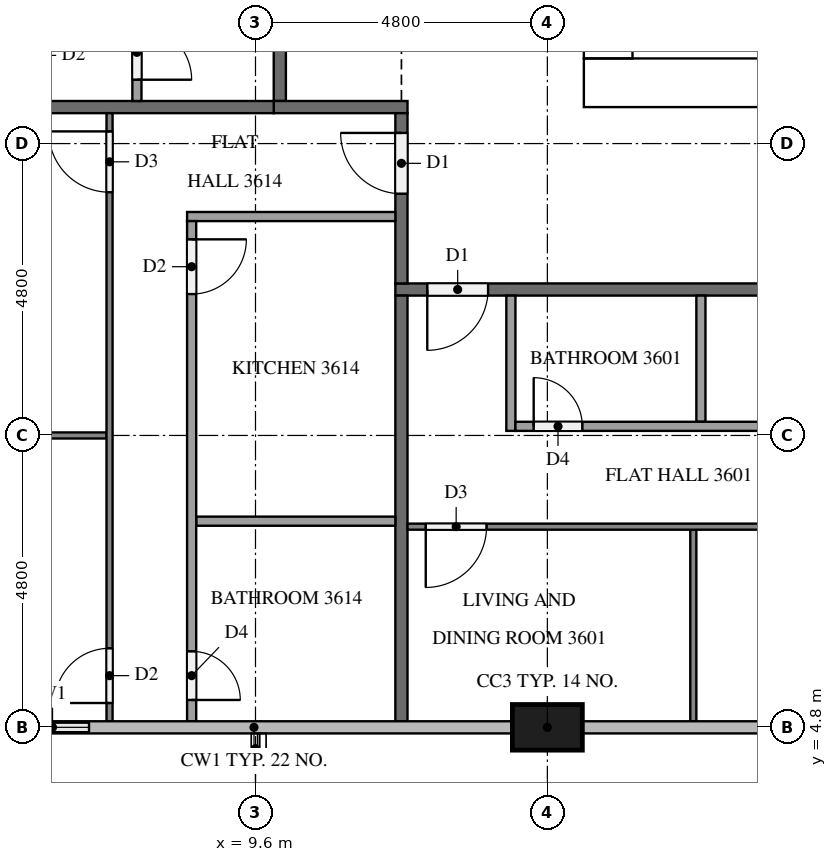
"""IFC4 building model, lengths in metres.
Left out: names, types, materials, properties, quantities, classifications, styles, units other than length and angle.
Written with IfcOpenShell. Run it as: python <this file> out.ifc"""

import sys

from ifc_helpers import new_model, si_unit, direction, frame, frame_2d, origin, origin_2d, place, context, subcontext, project, spatial, rectangle, extrude, element, fill, save


model = new_model("IFC4")
c1 = context("Model", 3, precision=1e-05, world=origin(), true_north=direction((0.0, 1.0)))
c2 = subcontext(c1, "Body", "Model", "MODEL_VIEW")
j1 = project(units=[si_unit("LENGTHUNIT", "METRE"), si_unit("PLANEANGLEUNIT", "RADIAN")], contexts=[c1])
p1 = place(None, origin())
s1 = spatial("IfcSite", under=j1, at=p1, CompositionType="ELEMENT")
p2 = place(p1, origin())
s2 = spatial("IfcBuilding", under=s1, at=p2, CompositionType="ELEMENT")
p3 = place(p2, frame((0.0, 0.0, 140.1)))
s3 = spatial("IfcBuildingStorey", under=s2, at=p3, CompositionType="ELEMENT", Elevation=140.1)
p4 = place(p3, frame((15.0, 15.4, 0.0), z_axis=(0.0, 0.0, 1.0), x_axis=(1.0, 0.0, 0.0)))
e1 = element("IfcWall", 1, at=p4, inside=s3, PredefinedType="SHEAR", context=c2, shape_type="SweptSolid", body=[
    extrude(rectangle(XDim=32.4, YDim=0.8, at=frame_2d((16.2, 0.0))), origin(), (0.0, 0.0, 1.0), 3.1),
])
p5 = place(p4, frame((15.3, 0.0, 0.0)))
e2 = element("IfcOpeningElement", 2, at=p5, cuts=e1, PredefinedType="OPENING", context=c2, shape_type="SweptSolid", body=[
    extrude(rectangle(XDim=1.8, YDim=2.1, at=frame_2d((0.9, 1.05))), frame((0.0, 0.41, 0.0), z_axis=(0.0, -1.0, 0.0), x_axis=(1.0, 0.0, 0.0)), (0.0, 0.0, 1.0), 0.82),
])
p6 = place(p3, frame((15.4, 15.8, 0.0), z_axis=(0.0, 0.0, 1.0), x_axis=(0.0, 1.0, 0.0)))
e3 = element("IfcWall", 3, at=p6, inside=s3, PredefinedType="SHEAR", context=c2, shape_type="SweptSolid", body=[
    extrude(rectangle(XDim=21.2, YDim=0.8, at=frame_2d((10.6, 0.0))), origin(), (0.0, 0.0, 1.0), 3.1),
])
p7 = place(p6, frame((4.96, 0.0, 0.0)))
e4 = element("IfcOpeningElement", 4, at=p7, cuts=e3, PredefinedType="OPENING", context=c2, shape_type="SweptSolid", body=[
    extrude(rectangle(XDim=1.2, YDim=2.1, at=frame_2d((0.6, 1.05))), frame((0.0, 0.41, 0.0), z_axis=(0.0, -1.0, 0.0), x_axis=(1.0, 0.0, 0.0)), (0.0, 0.0, 1.0), 0.82),
])
p8 = place(p3, frame((14.4, 4.8, 0.0), z_axis=(0.0, 0.0, 1.0), x_axis=(1.0, 0.0, 0.0)))
e5 = element("IfcColumn", 5, at=p8, inside=s3, PredefinedType="COLUMN", context=c2, shape_type="SweptSolid", body=[
    extrude(rectangle(XDim=1.15, YDim=0.75, at=origin_2d()), origin(), (0.0, 0.0, 1.0), 3.1),
])
p9 = place(p3, frame((5.325, 4.8, 0.0), z_axis=(0.0, 0.0, 1.0), x_axis=(1.0, 0.0, 0.0)))
e6 = element("IfcWall", 6, at=p9, inside=s3, PredefinedType="SOLIDWALL", context=c2, shape_type="SweptSolid", body=[
    extrude(rectangle(XDim=1.875, YDim=0.15, at=frame_2d((0.938, 0.0))), origin(), (0.0, 0.0, 1.0), 3.1),
])
p10 = place(p9, frame((0.337, 0.0, 0.9)))
e7 = element("IfcOpeningElement", 7, at=p10, cuts=e6, PredefinedType="OPENING", context=c2, shape_type="SweptSolid", body=[
    extrude(rectangle(XDim=1.2, YDim=1.4, at=frame_2d((0.6, 0.7))), frame((0.0, 0.085, 0.0), z_axis=(0.0, -1.0, 0.0), x_axis=(1.0, 0.0, 0.0)), (0.0, 0.0, 1.0), 0.17),
])
p11 = place(p3, frame((50.5, 12.0, 0.0), z_axis=(0.0, 0.0, 1.0), x_axis=(-1.0, 0.0, 0.0)))
e8 = element("IfcWall", 8, at=p11, inside=s3, PredefinedType="PARTITIONING", context=c2, shape_type="SweptSolid", body=[
    extrude(rectangle(XDim=38.6, YDim=0.2, at=frame_2d((19.3, 0.0))), origin(), (0.0, 0.0, 1.0), 3.1),
])
p12 = place(p11, frame((37.075, 0.0, 0.0)))
e9 = element("IfcOpeningElement", 9, at=p12, cuts=e8, PredefinedType="OPENING", context=c2, shape_type="SweptSolid", body=[
    extrude(rectangle(XDim=1.0, YDim=2.1, at=frame_2d((0.5, 1.05))), frame((0.0, 0.11, 0.0), z_axis=(0.0, -1.0, 0.0), x_axis=(1.0, 0.0, 0.0)), (0.0, 0.0, 1.0), 0.22),
])
p13 = place(p11, frame((27.475, 0.0, 0.0)))
e10 = element("IfcOpeningElement", 10, at=p13, cuts=e8, PredefinedType="OPENING", context=c2, shape_type="SweptSolid", body=[
    extrude(rectangle(XDim=1.0, YDim=2.1, at=frame_2d((0.5, 1.05))), frame((0.0, 0.11, 0.0), z_axis=(0.0, -1.0, 0.0), x_axis=(1.0, 0.0, 0.0)), (0.0, 0.0, 1.0), 0.22),
])
p14 = place(p11, frame((0.525, 0.0, 0.0)))
e11 = element("IfcOpeningElement", 11, at=p14, cuts=e8, PredefinedType="OPENING", context=c2, shape_type="SweptSolid", body=[
    extrude(rectangle(XDim=1.0, YDim=2.1, at=frame_2d((0.5, 1.05))), frame((0.0, 0.11, 0.0), z_axis=(0.0, -1.0, 0.0), x_axis=(1.0, 0.0, 0.0)), (0.0, 0.0, 1.0), 0.22),
])
p15 = place(p3, frame((10.0, 15.1, 0.0), z_axis=(0.0, 0.0, 1.0), x_axis=(0.0, 1.0, 0.0)))
e12 = element("IfcWall", 12, at=p15, inside=s3, PredefinedType="PARTITIONING", context=c2, shape_type="SweptSolid", body=[
    extrude(rectangle(XDim=22.6, YDim=0.2, at=frame_2d((11.3, 0.0))), origin(), (0.0, 0.0, 1.0), 3.1),
])
p16 = place(p15, frame((21.275, 0.0, 0.0)))
e13 = element("IfcOpeningElement", 13, at=p16, cuts=e12, PredefinedType="OPENING", context=c2, shape_type="SweptSolid", body=[
    extrude(rectangle(XDim=1.0, YDim=2.1, at=frame_2d((0.5, 1.05))), frame((0.0, 0.11, 0.0), z_axis=(0.0, -1.0, 0.0), x_axis=(1.0, 0.0, 0.0)), (0.0, 0.0, 1.0), 0.22),
])
p17 = place(p15, frame((14.675, 0.0, 0.0)))
e14 = element("IfcOpeningElement", 14, at=p17, cuts=e12, PredefinedType="OPENING", context=c2, shape_type="SweptSolid", body=[
    extrude(rectangle(XDim=1.0, YDim=2.1, at=frame_2d((0.5, 1.05))), frame((0.0, 0.11, 0.0), z_axis=(0.0, -1.0, 0.0), x_axis=(1.0, 0.0, 0.0)), (0.0, 0.0, 1.0), 0.22),
])
p18 = place(p3, frame((9.9, 15.0, 0.0), z_axis=(0.0, 0.0, 1.0), x_axis=(1.0, 0.0, 0.0)))
e15 = element("IfcWall", 15, at=p18, inside=s3, PredefinedType="PARTITIONING", context=c2, shape_type="SweptSolid", body=[
    extrude(rectangle(XDim=2.2, YDim=0.2, at=frame_2d((1.1, 0.0))), origin(), (0.0, 0.0, 1.0), 3.1),
])
p19 = place(p3, frame((12.0, 12.1, 0.0), z_axis=(0.0, 0.0, 1.0), x_axis=(0.0, 1.0, 0.0)))
e16 = element("IfcWall", 16, at=p19, inside=s3, PredefinedType="PARTITIONING", context=c2, shape_type="SweptSolid", body=[
    extrude(rectangle(XDim=2.8, YDim=0.2, at=frame_2d((1.4, 0.0))), origin(), (0.0, 0.0, 1.0), 3.1),
])
p20 = place(p19, frame((1.475, 0.0, 0.0)))
e17 = element("IfcOpeningElement", 17, at=p20, cuts=e16, PredefinedType="OPENING", context=c2, shape_type="SweptSolid", body=[
    extrude(rectangle(XDim=1.0, YDim=2.1, at=frame_2d((0.5, 1.05))), frame((0.0, 0.11, 0.0), z_axis=(0.0, -1.0, 0.0), x_axis=(1.0, 0.0, 0.0)), (0.0, 0.0, 1.0), 0.22),
])
p21 = place(p3, frame((12.0, 4.9, 0.0), z_axis=(0.0, 0.0, 1.0), x_axis=(0.0, 1.0, 0.0)))
e18 = element("IfcWall", 18, at=p21, inside=s3, PredefinedType="PARTITIONING", context=c2, shape_type="SweptSolid", body=[
    extrude(rectangle(XDim=7.0, YDim=0.2, at=frame_2d((3.5, 0.0))), origin(), (0.0, 0.0, 1.0), 3.1),
])
p22 = place(p3, frame((0.1, 15.0, 0.0), z_axis=(0.0, 0.0, 1.0), x_axis=(1.0, 0.0, 0.0)))
e19 = element("IfcWall", 19, at=p22, inside=s3, PredefinedType="PARTITIONING", context=c2, shape_type="SweptSolid", body=[
    extrude(rectangle(XDim=9.8, YDim=0.2, at=frame_2d((4.9, 0.0))), origin(), (0.0, 0.0, 1.0), 3.1),
])
p23 = place(p3, frame((16.8, 8.05, 0.0), z_axis=(0.0, 0.0, 1.0), x_axis=(0.0, -1.0, 0.0)))
e20 = element("IfcWall", 20, at=p23, inside=s3, PredefinedType="PARTITIONING", context=c2, shape_type="SweptSolid", body=[
    extrude(rectangle(XDim=3.15, YDim=0.1, at=frame_2d((1.575, 0.0))), origin(), (0.0, 0.0, 1.0), 3.1),
])
p24 = place(p3, frame((21.5, 8.1, 0.0), z_axis=(0.0, 0.0, 1.0), x_axis=(-1.0, 0.0, 0.0)))
e21 = element("IfcWall", 21, at=p24, inside=s3, PredefinedType="PARTITIONING", context=c2, shape_type="SweptSolid", body=[
    extrude(rectangle(XDim=9.4, YDim=0.1, at=frame_2d((4.7, 0.0))), origin(), (0.0, 0.0, 1.0), 3.1),
])
p25 = place(p24, frame((8.1, 0.0, 0.0)))
e22 = element("IfcOpeningElement", 22, at=p25, cuts=e21, PredefinedType="OPENING", context=c2, shape_type="SweptSolid", body=[
    extrude(rectangle(XDim=1.0, YDim=2.1, at=frame_2d((0.5, 1.05))), frame((0.0, 0.06, 0.0), z_axis=(0.0, -1.0, 0.0), x_axis=(1.0, 0.0, 0.0)), (0.0, 0.0, 1.0), 0.12),
])
p26 = place(p24, frame((0.3, 0.0, 0.0)))
e23 = element("IfcOpeningElement", 23, at=p26, cuts=e21, PredefinedType="OPENING", context=c2, shape_type="SweptSolid", body=[
    extrude(rectangle(XDim=0.9, YDim=2.1, at=frame_2d((0.45, 1.05))), frame((0.0, 0.06, 0.0), z_axis=(0.0, -1.0, 0.0), x_axis=(1.0, 0.0, 0.0)), (0.0, 0.0, 1.0), 0.12),
])
p27 = place(p3, frame((16.925, 11.9, 0.0), z_axis=(0.0, 0.0, 1.0), x_axis=(0.0, -1.0, 0.0)))
e24 = element("IfcWall", 24, at=p27, inside=s3, PredefinedType="PARTITIONING", context=c2, shape_type="SweptSolid", body=[
    extrude(rectangle(XDim=2.075, YDim=0.15, at=frame_2d((1.038, 0.0))), origin(), (0.0, 0.0, 1.0), 3.1),
])
p28 = place(p3, frame((13.8, 11.9, 0.0), z_axis=(0.0, 0.0, 1.0), x_axis=(0.0, -1.0, 0.0)))
e25 = element("IfcWall", 25, at=p28, inside=s3, PredefinedType="PARTITIONING", context=c2, shape_type="SweptSolid", body=[
    extrude(rectangle(XDim=2.225, YDim=0.15, at=frame_2d((1.112, 0.0))), origin(), (0.0, 0.0, 1.0), 3.1),
])
p29 = place(p3, frame((13.875, 9.75, 0.0), z_axis=(0.0, 0.0, 1.0), x_axis=(1.0, 0.0, 0.0)))
e26 = element("IfcWall", 26, at=p29, inside=s3, PredefinedType="PARTITIONING", context=c2, shape_type="SweptSolid", body=[
    extrude(rectangle(XDim=7.625, YDim=0.15, at=frame_2d((3.812, 0.0))), origin(), (0.0, 0.0, 1.0), 3.1),
])
p30 = place(p29, frame((0.3, 0.0, 0.0)))
e27 = element("IfcOpeningElement", 27, at=p30, cuts=e26, PredefinedType="OPENING", context=c2, shape_type="SweptSolid", body=[
    extrude(rectangle(XDim=0.8, YDim=2.1, at=frame_2d((0.4, 1.05))), frame((0.0, 0.085, 0.0), z_axis=(0.0, -1.0, 0.0), x_axis=(1.0, 0.0, 0.0)), (0.0, 0.0, 1.0), 0.17),
])
p31 = place(p29, frame((6.375, 0.0, 0.0)))
e28 = element("IfcOpeningElement", 28, at=p31, cuts=e26, PredefinedType="OPENING", context=c2, shape_type="SweptSolid", body=[
    extrude(rectangle(XDim=0.9, YDim=2.1, at=frame_2d((0.45, 1.05))), frame((0.0, 0.085, 0.0), z_axis=(0.0, -1.0, 0.0), x_axis=(1.0, 0.0, 0.0)), (0.0, 0.0, 1.0), 0.17),
])
p32 = place(p3, frame((7.65, 29.325, 0.0), z_axis=(0.0, 0.0, 1.0), x_axis=(0.0, -1.0, 0.0)))
e29 = element("IfcWall", 29, at=p32, inside=s3, PredefinedType="PARTITIONING", context=c2, shape_type="SweptSolid", body=[
    extrude(rectangle(XDim=14.225, YDim=0.15, at=frame_2d((7.112, 0.0))), origin(), (0.0, 0.0, 1.0), 3.1),
])
p33 = place(p32, frame((2.158, 0.0, 0.0)))
e30 = element("IfcOpeningElement", 30, at=p33, cuts=e29, PredefinedType="OPENING", context=c2, shape_type="SweptSolid", body=[
    extrude(rectangle(XDim=0.8, YDim=2.1, at=frame_2d((0.4, 1.05))), frame((0.0, 0.085, 0.0), z_axis=(0.0, -1.0, 0.0), x_axis=(1.0, 0.0, 0.0)), (0.0, 0.0, 1.0), 0.17),
])
p34 = place(p32, frame((3.608, 0.0, 0.0)))
e31 = element("IfcOpeningElement", 31, at=p34, cuts=e29, PredefinedType="OPENING", context=c2, shape_type="SweptSolid", body=[
    extrude(rectangle(XDim=0.9, YDim=2.1, at=frame_2d((0.45, 1.05))), frame((0.0, 0.085, 0.0), z_axis=(0.0, -1.0, 0.0), x_axis=(1.0, 0.0, 0.0)), (0.0, 0.0, 1.0), 0.17),
])
p35 = place(p32, frame((12.975, 0.0, 0.0)))
e32 = element("IfcOpeningElement", 32, at=p35, cuts=e29, PredefinedType="OPENING", context=c2, shape_type="SweptSolid", body=[
    extrude(rectangle(XDim=0.9, YDim=2.1, at=frame_2d((0.45, 1.05))), frame((0.0, 0.085, 0.0), z_axis=(0.0, -1.0, 0.0), x_axis=(1.0, 0.0, 0.0)), (0.0, 0.0, 1.0), 0.17),
])
p36 = place(p3, frame((7.15, 9.6, 0.0), z_axis=(0.0, 0.0, 1.0), x_axis=(-1.0, 0.0, 0.0)))
e33 = element("IfcWall", 33, at=p36, inside=s3, PredefinedType="PARTITIONING", context=c2, shape_type="SweptSolid", body=[
    extrude(rectangle(XDim=6.625, YDim=0.1, at=frame_2d((3.312, 0.0))), origin(), (0.0, 0.0, 1.0), 3.1),
])
p37 = place(p3, frame((7.2, 4.9, 0.0), z_axis=(0.0, 0.0, 1.0), x_axis=(0.0, 1.0, 0.0)))
e34 = element("IfcWall", 34, at=p37, inside=s3, PredefinedType="PARTITIONING", context=c2, shape_type="SweptSolid", body=[
    extrude(rectangle(XDim=10.0, YDim=0.1, at=frame_2d((5.0, 0.0))), origin(), (0.0, 0.0, 1.0), 3.1),
])
p38 = place(p37, frame((8.7, 0.0, 0.0)))
e35 = element("IfcOpeningElement", 35, at=p38, cuts=e34, PredefinedType="OPENING", context=c2, shape_type="SweptSolid", body=[
    extrude(rectangle(XDim=1.0, YDim=2.1, at=frame_2d((0.5, 1.05))), frame((0.0, 0.06, 0.0), z_axis=(0.0, -1.0, 0.0), x_axis=(1.0, 0.0, 0.0)), (0.0, 0.0, 1.0), 0.12),
])
p39 = place(p37, frame((0.3, 0.0, 0.0)))
e36 = element("IfcOpeningElement", 36, at=p39, cuts=e34, PredefinedType="OPENING", context=c2, shape_type="SweptSolid", body=[
    extrude(rectangle(XDim=0.9, YDim=2.1, at=frame_2d((0.45, 1.05))), frame((0.0, 0.06, 0.0), z_axis=(0.0, -1.0, 0.0), x_axis=(1.0, 0.0, 0.0)), (0.0, 0.0, 1.0), 0.12),
])
p40 = place(p3, frame((11.9, 8.19, 0.0), z_axis=(0.0, 0.0, 1.0), x_axis=(-1.0, 0.0, 0.0)))
e37 = element("IfcWall", 37, at=p40, inside=s3, PredefinedType="PARTITIONING", context=c2, shape_type="SweptSolid", body=[
    extrude(rectangle(XDim=3.275, YDim=0.15, at=frame_2d((1.637, 0.0))), origin(), (0.0, 0.0, 1.0), 3.1),
])
p41 = place(p3, frame((11.9, 13.2, 0.0), z_axis=(0.0, 0.0, 1.0), x_axis=(-1.0, 0.0, 0.0)))
e38 = element("IfcWall", 38, at=p41, inside=s3, PredefinedType="PARTITIONING", context=c2, shape_type="SweptSolid", body=[
    extrude(rectangle(XDim=3.425, YDim=0.15, at=frame_2d((1.712, 0.0))), origin(), (0.0, 0.0, 1.0), 3.1),
])
p42 = place(p3, frame((8.55, 13.125, 0.0), z_axis=(0.0, 0.0, 1.0), x_axis=(0.0, -1.0, 0.0)))
e39 = element("IfcWall", 39, at=p42, inside=s3, PredefinedType="PARTITIONING", context=c2, shape_type="SweptSolid", body=[
    extrude(rectangle(XDim=8.225, YDim=0.15, at=frame_2d((4.113, 0.0))), origin(), (0.0, 0.0, 1.0), 3.1),
])
p43 = place(p42, frame((0.3, 0.0, 0.0)))
e40 = element("IfcOpeningElement", 40, at=p43, cuts=e39, PredefinedType="OPENING", context=c2, shape_type="SweptSolid", body=[
    extrude(rectangle(XDim=0.9, YDim=2.1, at=frame_2d((0.45, 1.05))), frame((0.0, 0.085, 0.0), z_axis=(0.0, -1.0, 0.0), x_axis=(1.0, 0.0, 0.0)), (0.0, 0.0, 1.0), 0.17),
])
p44 = place(p42, frame((7.075, 0.0, 0.0)))
e41 = element("IfcOpeningElement", 41, at=p44, cuts=e39, PredefinedType="OPENING", context=c2, shape_type="SweptSolid", body=[
    extrude(rectangle(XDim=0.8, YDim=2.1, at=frame_2d((0.4, 1.05))), frame((0.0, 0.085, 0.0), z_axis=(0.0, -1.0, 0.0), x_axis=(1.0, 0.0, 0.0)), (0.0, 0.0, 1.0), 0.17),
])
p45 = place(p10, origin())
e42 = element("IfcWindow", 42, at=p45, inside=s3, PartitioningType="SINGLE_PANEL", PredefinedType="WINDOW", context=c2, shape_type="SweptSolid", body=[
    extrude(rectangle(XDim=1.2, YDim=1.4, at=frame_2d((0.6, 0.7))), frame((0.0, 0.03, 0.0), z_axis=(0.0, -1.0, 0.0), x_axis=(1.0, 0.0, 0.0)), (0.0, 0.0, 1.0), 0.06),
])
fill(e7, e42)
p46 = place(p12, origin())
e43 = element("IfcDoor", 43, at=p46, inside=s3, OperationType="SINGLE_SWING_RIGHT", PredefinedType="DOOR", context=c2, shape_type="SweptSolid", body=[
    extrude(rectangle(XDim=1.0, YDim=2.1, at=frame_2d((0.5, 1.05))), frame((0.0, 0.025, 0.0), z_axis=(0.0, -1.0, 0.0), x_axis=(1.0, 0.0, 0.0)), (0.0, 0.0, 1.0), 0.05),
])
fill(e9, e43)
p47 = place(p20, origin())
e44 = element("IfcDoor", 44, at=p47, inside=s3, OperationType="SINGLE_SWING_RIGHT", PredefinedType="DOOR", context=c2, shape_type="SweptSolid", body=[
    extrude(rectangle(XDim=1.0, YDim=2.1, at=frame_2d((0.5, 1.05))), frame((0.0, 0.025, 0.0), z_axis=(0.0, -1.0, 0.0), x_axis=(1.0, 0.0, 0.0)), (0.0, 0.0, 1.0), 0.05),
])
fill(e17, e44)
p48 = place(p25, origin())
e45 = element("IfcDoor", 45, at=p48, inside=s3, OperationType="SINGLE_SWING_RIGHT", PredefinedType="DOOR", context=c2, shape_type="SweptSolid", body=[
    extrude(rectangle(XDim=1.0, YDim=2.1, at=frame_2d((0.5, 1.05))), frame((0.0, 0.025, 0.0), z_axis=(0.0, -1.0, 0.0), x_axis=(1.0, 0.0, 0.0)), (0.0, 0.0, 1.0), 0.05),
])
fill(e22, e45)
p49 = place(p30, origin())
e46 = element("IfcDoor", 46, at=p49, inside=s3, OperationType="SINGLE_SWING_LEFT", PredefinedType="DOOR", context=c2, shape_type="SweptSolid", body=[
    extrude(rectangle(XDim=0.8, YDim=2.1, at=frame_2d((0.4, 1.05))), frame((0.0, 0.025, 0.0), z_axis=(0.0, -1.0, 0.0), x_axis=(1.0, 0.0, 0.0)), (0.0, 0.0, 1.0), 0.05),
])
fill(e27, e46)
p50 = place(p35, origin())
e47 = element("IfcDoor", 47, at=p50, inside=s3, OperationType="SINGLE_SWING_RIGHT", PredefinedType="DOOR", context=c2, shape_type="SweptSolid", body=[
    extrude(rectangle(XDim=0.9, YDim=2.1, at=frame_2d((0.45, 1.05))), frame((0.0, 0.025, 0.0), z_axis=(0.0, -1.0, 0.0), x_axis=(1.0, 0.0, 0.0)), (0.0, 0.0, 1.0), 0.05),
])
fill(e32, e47)
p51 = place(p38, origin())
e48 = element("IfcDoor", 48, at=p51, inside=s3, OperationType="SINGLE_SWING_RIGHT", PredefinedType="DOOR", context=c2, shape_type="SweptSolid", body=[
    extrude(rectangle(XDim=1.0, YDim=2.1, at=frame_2d((0.5, 1.05))), frame((0.0, 0.025, 0.0), z_axis=(0.0, -1.0, 0.0), x_axis=(1.0, 0.0, 0.0)), (0.0, 0.0, 1.0), 0.05),
])
fill(e35, e48)
p52 = place(p39, origin())
e49 = element("IfcDoor", 49, at=p52, inside=s3, OperationType="SINGLE_SWING_LEFT", PredefinedType="DOOR", context=c2, shape_type="SweptSolid", body=[
    extrude(rectangle(XDim=0.9, YDim=2.1, at=frame_2d((0.45, 1.05))), frame((0.0, 0.025, 0.0), z_axis=(0.0, -1.0, 0.0), x_axis=(1.0, 0.0, 0.0)), (0.0, 0.0, 1.0), 0.05),
])
fill(e36, e49)
p53 = place(p43, origin())
e50 = element("IfcDoor", 50, at=p53, inside=s3, OperationType="SINGLE_SWING_LEFT", PredefinedType="DOOR", context=c2, shape_type="SweptSolid", body=[
    extrude(rectangle(XDim=0.9, YDim=2.1, at=frame_2d((0.45, 1.05))), frame((0.0, 0.025, 0.0), z_axis=(0.0, -1.0, 0.0), x_axis=(1.0, 0.0, 0.0)), (0.0, 0.0, 1.0), 0.05),
])
fill(e40, e50)
p54 = place(p44, origin())
e51 = element("IfcDoor", 51, at=p54, inside=s3, OperationType="SINGLE_SWING_RIGHT", PredefinedType="DOOR", context=c2, shape_type="SweptSolid", body=[
    extrude(rectangle(XDim=0.8, YDim=2.1, at=frame_2d((0.4, 1.05))), frame((0.0, 0.025, 0.0), z_axis=(0.0, -1.0, 0.0), x_axis=(1.0, 0.0, 0.0)), (0.0, 0.0, 1.0), 0.05),
])
fill(e41, e51)
save(model, sys.argv[1])
